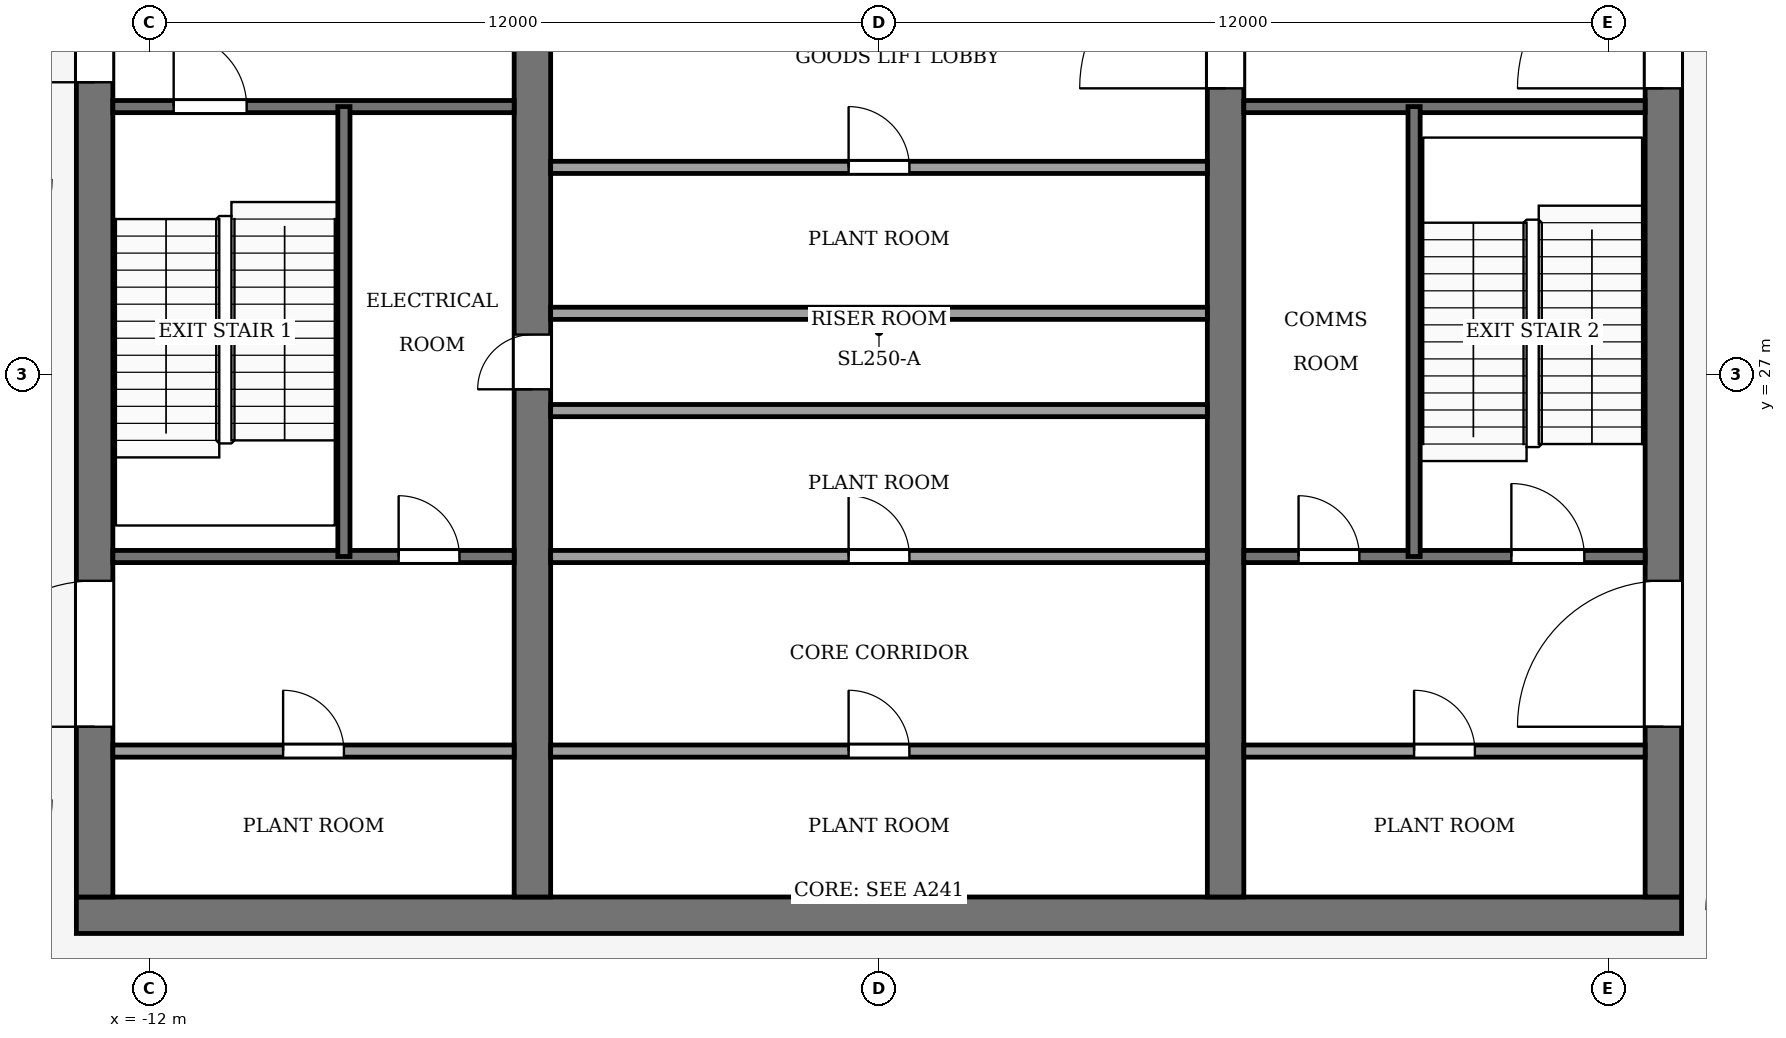
"""IFC4 building model, lengths in metres.
Left out: names, types, materials, properties, quantities, classifications, styles, units other than length and angle.
Written with IfcOpenShell. Run it as: python <this file> out.ifc"""

import sys

from ifc_helpers import new_model, si_unit, direction, frame, frame_2d, origin, place, context, subcontext, project, spatial, rectangle, extrude, element, fill, save


model = new_model("IFC4")
c1 = context("Model", 3, precision=1e-05, world=origin(), true_north=direction((0.0, 1.0)))
c2 = subcontext(c1, "Body", "Model", "MODEL_VIEW")
j1 = project(units=[si_unit("LENGTHUNIT", "METRE"), si_unit("PLANEANGLEUNIT", "RADIAN")], contexts=[c1])
p1 = place(None, origin())
s1 = spatial("IfcSite", under=j1, at=p1, CompositionType="ELEMENT")
p2 = place(p1, origin())
s2 = spatial("IfcBuilding", under=s1, at=p2, CompositionType="ELEMENT")
p3 = place(p2, frame((0.0, 0.0, 349.5)))
s3 = spatial("IfcBuildingStorey", under=s2, at=p3, CompositionType="ELEMENT", Elevation=349.5)
p4 = place(p3, frame((-13.2, 18.1, -0.15), z_axis=(0.0, 0.0, 1.0), x_axis=(1.0, 0.0, 0.0)))
e1 = element("IfcWall", 1, at=p4, inside=s3, PredefinedType="SHEAR", context=c2, shape_type="SweptSolid", body=[
    extrude(rectangle(XDim=26.4, YDim=0.6, at=frame_2d((13.2, 0.0))), origin(), (0.0, 0.0, 1.0), 5.0),
])
p5 = place(p3, frame((-12.9, 18.4, -0.15), z_axis=(0.0, 0.0, 1.0), x_axis=(0.0, 1.0, 0.0)))
e2 = element("IfcWall", 2, at=p5, inside=s3, PredefinedType="SHEAR", context=c2, shape_type="SweptSolid", body=[
    extrude(rectangle(XDim=19.2, YDim=0.6, at=frame_2d((9.6, 0.0))), origin(), (0.0, 0.0, 1.0), 5.0),
])
p6 = place(p5, frame((2.8, 0.0, 0.15)))
e3 = element("IfcOpeningElement", 3, at=p6, cuts=e2, PredefinedType="OPENING", context=c2, shape_type="SweptSolid", body=[
    extrude(rectangle(XDim=2.4, YDim=2.4, at=frame_2d((1.2, 1.2))), frame((0.0, 0.31, 0.0), z_axis=(0.0, -1.0, 0.0), x_axis=(1.0, 0.0, 0.0)), (0.0, 0.0, 1.0), 0.62),
])
p7 = place(p5, frame((13.4, 0.0, 0.15)))
e4 = element("IfcOpeningElement", 4, at=p7, cuts=e2, PredefinedType="OPENING", context=c2, shape_type="SweptSolid", body=[
    extrude(rectangle(XDim=1.4, YDim=2.2, at=frame_2d((0.7, 1.1))), frame((0.0, 0.31, 0.0), z_axis=(0.0, -1.0, 0.0), x_axis=(1.0, 0.0, 0.0)), (0.0, 0.0, 1.0), 0.62),
])
p8 = place(p3, frame((12.9, 18.4, -0.15), z_axis=(0.0, 0.0, 1.0), x_axis=(0.0, 1.0, 0.0)))
e5 = element("IfcWall", 5, at=p8, inside=s3, PredefinedType="SHEAR", context=c2, shape_type="SweptSolid", body=[
    extrude(rectangle(XDim=19.2, YDim=0.6, at=frame_2d((9.6, 0.0))), origin(), (0.0, 0.0, 1.0), 5.0),
])
p9 = place(p8, frame((2.8, 0.0, 0.15)))
e6 = element("IfcOpeningElement", 6, at=p9, cuts=e5, PredefinedType="OPENING", context=c2, shape_type="SweptSolid", body=[
    extrude(rectangle(XDim=2.4, YDim=2.4, at=frame_2d((1.2, 1.2))), frame((0.0, 0.31, 0.0), z_axis=(0.0, -1.0, 0.0), x_axis=(1.0, 0.0, 0.0)), (0.0, 0.0, 1.0), 0.62),
])
p10 = place(p8, frame((13.3, 0.0, 0.15)))
e7 = element("IfcOpeningElement", 7, at=p10, cuts=e5, PredefinedType="OPENING", context=c2, shape_type="SweptSolid", body=[
    extrude(rectangle(XDim=2.4, YDim=2.4, at=frame_2d((1.2, 1.2))), frame((0.0, 0.31, 0.0), z_axis=(0.0, -1.0, 0.0), x_axis=(1.0, 0.0, 0.0)), (0.0, 0.0, 1.0), 0.62),
])
p11 = place(p3, frame((-5.7, 18.4, -0.15), z_axis=(0.0, 0.0, 1.0), x_axis=(0.0, 1.0, 0.0)))
e8 = element("IfcWall", 8, at=p11, inside=s3, PredefinedType="SHEAR", context=c2, shape_type="SweptSolid", body=[
    extrude(rectangle(XDim=19.2, YDim=0.6, at=frame_2d((9.6, 0.0))), origin(), (0.0, 0.0, 1.0), 5.0),
])
p12 = place(p11, frame((8.35, 0.0, 0.15)))
e9 = element("IfcOpeningElement", 9, at=p12, cuts=e8, PredefinedType="OPENING", context=c2, shape_type="SweptSolid", body=[
    extrude(rectangle(XDim=0.9, YDim=2.1, at=frame_2d((0.45, 1.05))), frame((0.0, 0.31, 0.0), z_axis=(0.0, -1.0, 0.0), x_axis=(1.0, 0.0, 0.0)), (0.0, 0.0, 1.0), 0.62),
])
p13 = place(p3, frame((5.7, 18.4, -0.15), z_axis=(0.0, 0.0, 1.0), x_axis=(0.0, 1.0, 0.0)))
e10 = element("IfcWall", 10, at=p13, inside=s3, PredefinedType="SHEAR", context=c2, shape_type="SweptSolid", body=[
    extrude(rectangle(XDim=19.2, YDim=0.6, at=frame_2d((9.6, 0.0))), origin(), (0.0, 0.0, 1.0), 5.0),
])
p14 = place(p13, frame((13.3, 0.0, 0.15)))
e11 = element("IfcOpeningElement", 11, at=p14, cuts=e10, PredefinedType="OPENING", context=c2, shape_type="SweptSolid", body=[
    extrude(rectangle(XDim=2.4, YDim=2.4, at=frame_2d((1.2, 1.2))), frame((0.0, 0.31, 0.0), z_axis=(0.0, -1.0, 0.0), x_axis=(1.0, 0.0, 0.0)), (0.0, 0.0, 1.0), 0.62),
])
p15 = place(p3, frame((-12.6, 20.8, 0.0), z_axis=(0.0, 0.0, 1.0), x_axis=(1.0, 0.0, 0.0)))
e12 = element("IfcWall", 12, at=p15, inside=s3, PredefinedType="PARTITIONING", context=c2, shape_type="SweptSolid", body=[
    extrude(rectangle(XDim=6.6, YDim=0.2, at=frame_2d((3.3, 0.0))), origin(), (0.0, 0.0, 1.0), 4.85),
])
p16 = place(p15, frame((2.8, 0.0, 0.0)))
e13 = element("IfcOpeningElement", 13, at=p16, cuts=e12, PredefinedType="OPENING", context=c2, shape_type="SweptSolid", body=[
    extrude(rectangle(XDim=1.0, YDim=2.1, at=frame_2d((0.5, 1.05))), frame((0.0, 0.11, 0.0), z_axis=(0.0, -1.0, 0.0), x_axis=(1.0, 0.0, 0.0)), (0.0, 0.0, 1.0), 0.22),
])
p17 = place(p3, frame((-5.4, 20.8, 0.0), z_axis=(0.0, 0.0, 1.0), x_axis=(1.0, 0.0, 0.0)))
e14 = element("IfcWall", 14, at=p17, inside=s3, PredefinedType="PARTITIONING", context=c2, shape_type="SweptSolid", body=[
    extrude(rectangle(XDim=10.8, YDim=0.2, at=frame_2d((5.4, 0.0))), origin(), (0.0, 0.0, 1.0), 4.85),
])
p18 = place(p17, frame((4.9, 0.0, 0.0)))
e15 = element("IfcOpeningElement", 15, at=p18, cuts=e14, PredefinedType="OPENING", context=c2, shape_type="SweptSolid", body=[
    extrude(rectangle(XDim=1.0, YDim=2.1, at=frame_2d((0.5, 1.05))), frame((0.0, 0.11, 0.0), z_axis=(0.0, -1.0, 0.0), x_axis=(1.0, 0.0, 0.0)), (0.0, 0.0, 1.0), 0.22),
])
p19 = place(p3, frame((6.0, 20.8, 0.0), z_axis=(0.0, 0.0, 1.0), x_axis=(1.0, 0.0, 0.0)))
e16 = element("IfcWall", 16, at=p19, inside=s3, PredefinedType="PARTITIONING", context=c2, shape_type="SweptSolid", body=[
    extrude(rectangle(XDim=6.6, YDim=0.2, at=frame_2d((3.3, 0.0))), origin(), (0.0, 0.0, 1.0), 4.85),
])
p20 = place(p19, frame((2.8, 0.0, 0.0)))
e17 = element("IfcOpeningElement", 17, at=p20, cuts=e16, PredefinedType="OPENING", context=c2, shape_type="SweptSolid", body=[
    extrude(rectangle(XDim=1.0, YDim=2.1, at=frame_2d((0.5, 1.05))), frame((0.0, 0.11, 0.0), z_axis=(0.0, -1.0, 0.0), x_axis=(1.0, 0.0, 0.0)), (0.0, 0.0, 1.0), 0.22),
])
p21 = place(p3, frame((-12.6, 24.0, 0.0), z_axis=(0.0, 0.0, 1.0), x_axis=(1.0, 0.0, 0.0)))
e18 = element("IfcWall", 18, at=p21, inside=s3, PredefinedType="PARTITIONING", context=c2, shape_type="SweptSolid", body=[
    extrude(rectangle(XDim=6.6, YDim=0.2, at=frame_2d((3.3, 0.0))), origin(), (0.0, 0.0, 1.0), 4.85),
])
p22 = place(p21, frame((4.7, 0.0, 0.0)))
e19 = element("IfcOpeningElement", 19, at=p22, cuts=e18, PredefinedType="OPENING", context=c2, shape_type="SweptSolid", body=[
    extrude(rectangle(XDim=1.0, YDim=2.1, at=frame_2d((0.5, 1.05))), frame((0.0, 0.11, 0.0), z_axis=(0.0, -1.0, 0.0), x_axis=(1.0, 0.0, 0.0)), (0.0, 0.0, 1.0), 0.22),
])
p23 = place(p3, frame((-5.4, 24.0, 0.0), z_axis=(0.0, 0.0, 1.0), x_axis=(1.0, 0.0, 0.0)))
e20 = element("IfcWall", 20, at=p23, inside=s3, PredefinedType="PARTITIONING", context=c2, shape_type="SweptSolid", body=[
    extrude(rectangle(XDim=10.8, YDim=0.2, at=frame_2d((5.4, 0.0))), origin(), (0.0, 0.0, 1.0), 4.85),
])
p24 = place(p23, frame((4.9, 0.0, 0.0)))
e21 = element("IfcOpeningElement", 21, at=p24, cuts=e20, PredefinedType="OPENING", context=c2, shape_type="SweptSolid", body=[
    extrude(rectangle(XDim=1.0, YDim=2.1, at=frame_2d((0.5, 1.05))), frame((0.0, 0.11, 0.0), z_axis=(0.0, -1.0, 0.0), x_axis=(1.0, 0.0, 0.0)), (0.0, 0.0, 1.0), 0.22),
])
p25 = place(p3, frame((6.0, 24.0, 0.0), z_axis=(0.0, 0.0, 1.0), x_axis=(1.0, 0.0, 0.0)))
e22 = element("IfcWall", 22, at=p25, inside=s3, PredefinedType="PARTITIONING", context=c2, shape_type="SweptSolid", body=[
    extrude(rectangle(XDim=6.6, YDim=0.2, at=frame_2d((3.3, 0.0))), origin(), (0.0, 0.0, 1.0), 4.85),
])
p26 = place(p25, frame((0.9, 0.0, 0.0)))
e23 = element("IfcOpeningElement", 23, at=p26, cuts=e22, PredefinedType="OPENING", context=c2, shape_type="SweptSolid", body=[
    extrude(rectangle(XDim=1.0, YDim=2.1, at=frame_2d((0.5, 1.05))), frame((0.0, 0.11, 0.0), z_axis=(0.0, -1.0, 0.0), x_axis=(1.0, 0.0, 0.0)), (0.0, 0.0, 1.0), 0.22),
])
p27 = place(p25, frame((4.4, 0.0, 0.0)))
e24 = element("IfcOpeningElement", 24, at=p27, cuts=e22, PredefinedType="OPENING", context=c2, shape_type="SweptSolid", body=[
    extrude(rectangle(XDim=1.2, YDim=2.2, at=frame_2d((0.6, 1.1))), frame((0.0, 0.11, 0.0), z_axis=(0.0, -1.0, 0.0), x_axis=(1.0, 0.0, 0.0)), (0.0, 0.0, 1.0), 0.22),
])
for number, where, z_axis, x_axis in (
    (25, (-5.4, 26.4, 0.0), (0.0, 0.0, 1.0), (1.0, 0.0, 0.0)),
    (26, (-5.4, 28.0, 0.0), (0.0, 0.0, 1.0), (1.0, 0.0, 0.0)),
):
    element("IfcWall", number, at=place(p3, frame(where, z_axis=z_axis, x_axis=x_axis)), inside=s3, PredefinedType="PARTITIONING", context=c2, shape_type="SweptSolid", body=[
        extrude(rectangle(XDim=10.8, YDim=0.2, at=frame_2d((5.4, 0.0))), origin(), (0.0, 0.0, 1.0), 4.85),
    ])
p28 = place(p3, frame((-5.4, 30.4, 0.0), z_axis=(0.0, 0.0, 1.0), x_axis=(1.0, 0.0, 0.0)))
e27 = element("IfcWall", 27, at=p28, inside=s3, PredefinedType="PARTITIONING", context=c2, shape_type="SweptSolid", body=[
    extrude(rectangle(XDim=10.8, YDim=0.2, at=frame_2d((5.4, 0.0))), origin(), (0.0, 0.0, 1.0), 4.85),
])
p29 = place(p28, frame((4.9, 0.0, 0.0)))
e28 = element("IfcOpeningElement", 28, at=p29, cuts=e27, PredefinedType="OPENING", context=c2, shape_type="SweptSolid", body=[
    extrude(rectangle(XDim=1.0, YDim=2.1, at=frame_2d((0.5, 1.05))), frame((0.0, 0.11, 0.0), z_axis=(0.0, -1.0, 0.0), x_axis=(1.0, 0.0, 0.0)), (0.0, 0.0, 1.0), 0.22),
])
p30 = place(p3, frame((-12.6, 31.4, 0.0), z_axis=(0.0, 0.0, 1.0), x_axis=(1.0, 0.0, 0.0)))
e29 = element("IfcWall", 29, at=p30, inside=s3, PredefinedType="PARTITIONING", context=c2, shape_type="SweptSolid", body=[
    extrude(rectangle(XDim=6.6, YDim=0.2, at=frame_2d((3.3, 0.0))), origin(), (0.0, 0.0, 1.0), 4.85),
])
p31 = place(p30, frame((1.0, 0.0, 0.0)))
e30 = element("IfcOpeningElement", 30, at=p31, cuts=e29, PredefinedType="OPENING", context=c2, shape_type="SweptSolid", body=[
    extrude(rectangle(XDim=1.2, YDim=2.2, at=frame_2d((0.6, 1.1))), frame((0.0, 0.11, 0.0), z_axis=(0.0, -1.0, 0.0), x_axis=(1.0, 0.0, 0.0)), (0.0, 0.0, 1.0), 0.22),
])
p32 = place(p3, frame((6.0, 31.4, 0.0), z_axis=(0.0, 0.0, 1.0), x_axis=(1.0, 0.0, 0.0)))
e31 = element("IfcWall", 31, at=p32, inside=s3, PredefinedType="PARTITIONING", context=c2, shape_type="SweptSolid", body=[
    extrude(rectangle(XDim=6.6, YDim=0.2, at=frame_2d((3.3, 0.0))), origin(), (0.0, 0.0, 1.0), 4.85),
])
for number, where, z_axis, x_axis in (
    (32, (-8.8, 24.0, 0.0), (0.0, 0.0, 1.0), (0.0, 1.0, 0.0)),
    (33, (8.8, 24.0, 0.0), (0.0, 0.0, 1.0), (0.0, 1.0, 0.0)),
):
    element("IfcWall", number, at=place(p3, frame(where, z_axis=z_axis, x_axis=x_axis)), inside=s3, PredefinedType="PARTITIONING", context=c2, shape_type="SweptSolid", body=[
        extrude(rectangle(XDim=7.4, YDim=0.2, at=frame_2d((3.7, 0.0))), origin(), (0.0, 0.0, 1.0), 4.85),
    ])
p33 = place(p18, origin())
e34 = element("IfcDoor", 34, at=p33, inside=s3, OperationType="SINGLE_SWING_LEFT", PredefinedType="DOOR", context=c2, shape_type="SweptSolid", body=[
    extrude(rectangle(XDim=1.0, YDim=2.1, at=frame_2d((0.5, 1.05))), frame((0.0, 0.025, 0.0), z_axis=(0.0, -1.0, 0.0), x_axis=(1.0, 0.0, 0.0)), (0.0, 0.0, 1.0), 0.05),
])
fill(e15, e34)
p34 = place(p24, origin())
e35 = element("IfcDoor", 35, at=p34, inside=s3, OperationType="SINGLE_SWING_RIGHT", PredefinedType="DOOR", context=c2, shape_type="SweptSolid", body=[
    extrude(rectangle(XDim=1.0, YDim=2.1, at=frame_2d((0.5, 1.05))), frame((0.0, 0.025, 0.0), z_axis=(0.0, -1.0, 0.0), x_axis=(1.0, 0.0, 0.0)), (0.0, 0.0, 1.0), 0.05),
])
fill(e21, e35)
p35 = place(p29, origin())
e36 = element("IfcDoor", 36, at=p35, inside=s3, OperationType="SINGLE_SWING_LEFT", PredefinedType="DOOR", context=c2, shape_type="SweptSolid", body=[
    extrude(rectangle(XDim=1.0, YDim=2.1, at=frame_2d((0.5, 1.05))), frame((0.0, 0.025, 0.0), z_axis=(0.0, -1.0, 0.0), x_axis=(1.0, 0.0, 0.0)), (0.0, 0.0, 1.0), 0.05),
])
fill(e28, e36)
p36 = place(p16, origin())
e37 = element("IfcDoor", 37, at=p36, inside=s3, OperationType="SINGLE_SWING_RIGHT", PredefinedType="DOOR", context=c2, shape_type="SweptSolid", body=[
    extrude(rectangle(XDim=1.0, YDim=2.1, at=frame_2d((0.5, 1.05))), frame((0.0, 0.025, 0.0), z_axis=(0.0, -1.0, 0.0), x_axis=(1.0, 0.0, 0.0)), (0.0, 0.0, 1.0), 0.05),
])
fill(e13, e37)
p37 = place(p20, origin())
e38 = element("IfcDoor", 38, at=p37, inside=s3, OperationType="SINGLE_SWING_LEFT", PredefinedType="DOOR", context=c2, shape_type="SweptSolid", body=[
    extrude(rectangle(XDim=1.0, YDim=2.1, at=frame_2d((0.5, 1.05))), frame((0.0, 0.025, 0.0), z_axis=(0.0, -1.0, 0.0), x_axis=(1.0, 0.0, 0.0)), (0.0, 0.0, 1.0), 0.05),
])
fill(e17, e38)
p38 = place(p22, origin())
e39 = element("IfcDoor", 39, at=p38, inside=s3, OperationType="SINGLE_SWING_LEFT", PredefinedType="DOOR", context=c2, shape_type="SweptSolid", body=[
    extrude(rectangle(XDim=1.0, YDim=2.1, at=frame_2d((0.5, 1.05))), frame((0.0, 0.025, 0.0), z_axis=(0.0, -1.0, 0.0), x_axis=(1.0, 0.0, 0.0)), (0.0, 0.0, 1.0), 0.05),
])
fill(e19, e39)
p39 = place(p26, origin())
e40 = element("IfcDoor", 40, at=p39, inside=s3, OperationType="SINGLE_SWING_RIGHT", PredefinedType="DOOR", context=c2, shape_type="SweptSolid", body=[
    extrude(rectangle(XDim=1.0, YDim=2.1, at=frame_2d((0.5, 1.05))), frame((0.0, 0.025, 0.0), z_axis=(0.0, -1.0, 0.0), x_axis=(1.0, 0.0, 0.0)), (0.0, 0.0, 1.0), 0.05),
])
fill(e23, e40)
p40 = place(p12, origin())
e41 = element("IfcDoor", 41, at=p40, inside=s3, OperationType="SINGLE_SWING_LEFT", PredefinedType="DOOR", context=c2, shape_type="SweptSolid", body=[
    extrude(rectangle(XDim=0.9, YDim=2.1, at=frame_2d((0.45, 1.05))), frame((0.0, 0.025, 0.0), z_axis=(0.0, -1.0, 0.0), x_axis=(1.0, 0.0, 0.0)), (0.0, 0.0, 1.0), 0.05),
])
fill(e9, e41)
p41 = place(p31, origin())
e42 = element("IfcDoor", 42, at=p41, inside=s3, OperationType="SINGLE_SWING_LEFT", PredefinedType="DOOR", context=c2, shape_type="SweptSolid", body=[
    extrude(rectangle(XDim=1.2, YDim=2.2, at=frame_2d((0.6, 1.1))), frame((0.0, 0.025, 0.0), z_axis=(0.0, -1.0, 0.0), x_axis=(1.0, 0.0, 0.0)), (0.0, 0.0, 1.0), 0.05),
])
fill(e30, e42)
p42 = place(p27, origin())
e43 = element("IfcDoor", 43, at=p42, inside=s3, OperationType="SINGLE_SWING_RIGHT", PredefinedType="DOOR", context=c2, shape_type="SweptSolid", body=[
    extrude(rectangle(XDim=1.2, YDim=2.2, at=frame_2d((0.6, 1.1))), frame((0.0, 0.025, 0.0), z_axis=(0.0, -1.0, 0.0), x_axis=(1.0, 0.0, 0.0)), (0.0, 0.0, 1.0), 0.05),
])
fill(e24, e43)
p43 = place(p14, origin())
e44 = element("IfcDoor", 44, at=p43, inside=s3, OperationType="DOUBLE_DOOR_SINGLE_SWING", PredefinedType="DOOR", context=c2, shape_type="SweptSolid", body=[
    extrude(rectangle(XDim=2.4, YDim=2.4, at=frame_2d((1.2, 1.2))), frame((0.0, 0.025, 0.0), z_axis=(0.0, -1.0, 0.0), x_axis=(1.0, 0.0, 0.0)), (0.0, 0.0, 1.0), 0.05),
])
fill(e11, e44)
p44 = place(p6, origin())
e45 = element("IfcDoor", 45, at=p44, inside=s3, OperationType="DOUBLE_DOOR_SINGLE_SWING", PredefinedType="DOOR", context=c2, shape_type="SweptSolid", body=[
    extrude(rectangle(XDim=2.4, YDim=2.4, at=frame_2d((1.2, 1.2))), frame((0.0, 0.025, 0.0), z_axis=(0.0, -1.0, 0.0), x_axis=(1.0, 0.0, 0.0)), (0.0, 0.0, 1.0), 0.05),
])
fill(e3, e45)
p45 = place(p9, origin())
e46 = element("IfcDoor", 46, at=p45, inside=s3, OperationType="DOUBLE_DOOR_SINGLE_SWING", PredefinedType="DOOR", context=c2, shape_type="SweptSolid", body=[
    extrude(rectangle(XDim=2.4, YDim=2.4, at=frame_2d((1.2, 1.2))), frame((0.0, 0.025, 0.0), z_axis=(0.0, -1.0, 0.0), x_axis=(1.0, 0.0, 0.0)), (0.0, 0.0, 1.0), 0.05),
])
fill(e6, e46)
p46 = place(p10, origin())
e47 = element("IfcDoor", 47, at=p46, inside=s3, OperationType="DOUBLE_DOOR_SINGLE_SWING", PredefinedType="DOOR", context=c2, shape_type="SweptSolid", body=[
    extrude(rectangle(XDim=2.4, YDim=2.4, at=frame_2d((1.2, 1.2))), frame((0.0, 0.025, 0.0), z_axis=(0.0, -1.0, 0.0), x_axis=(1.0, 0.0, 0.0)), (0.0, 0.0, 1.0), 0.05),
])
fill(e7, e47)
p47 = place(p7, origin())
e48 = element("IfcDoor", 48, at=p47, inside=s3, OperationType="SINGLE_SWING_LEFT", PredefinedType="DOOR", context=c2, shape_type="SweptSolid", body=[
    extrude(rectangle(XDim=1.4, YDim=2.2, at=frame_2d((0.7, 1.1))), frame((0.0, 0.025, 0.0), z_axis=(0.0, -1.0, 0.0), x_axis=(1.0, 0.0, 0.0)), (0.0, 0.0, 1.0), 0.05),
])
fill(e4, e48)
save(model, sys.argv[1])
